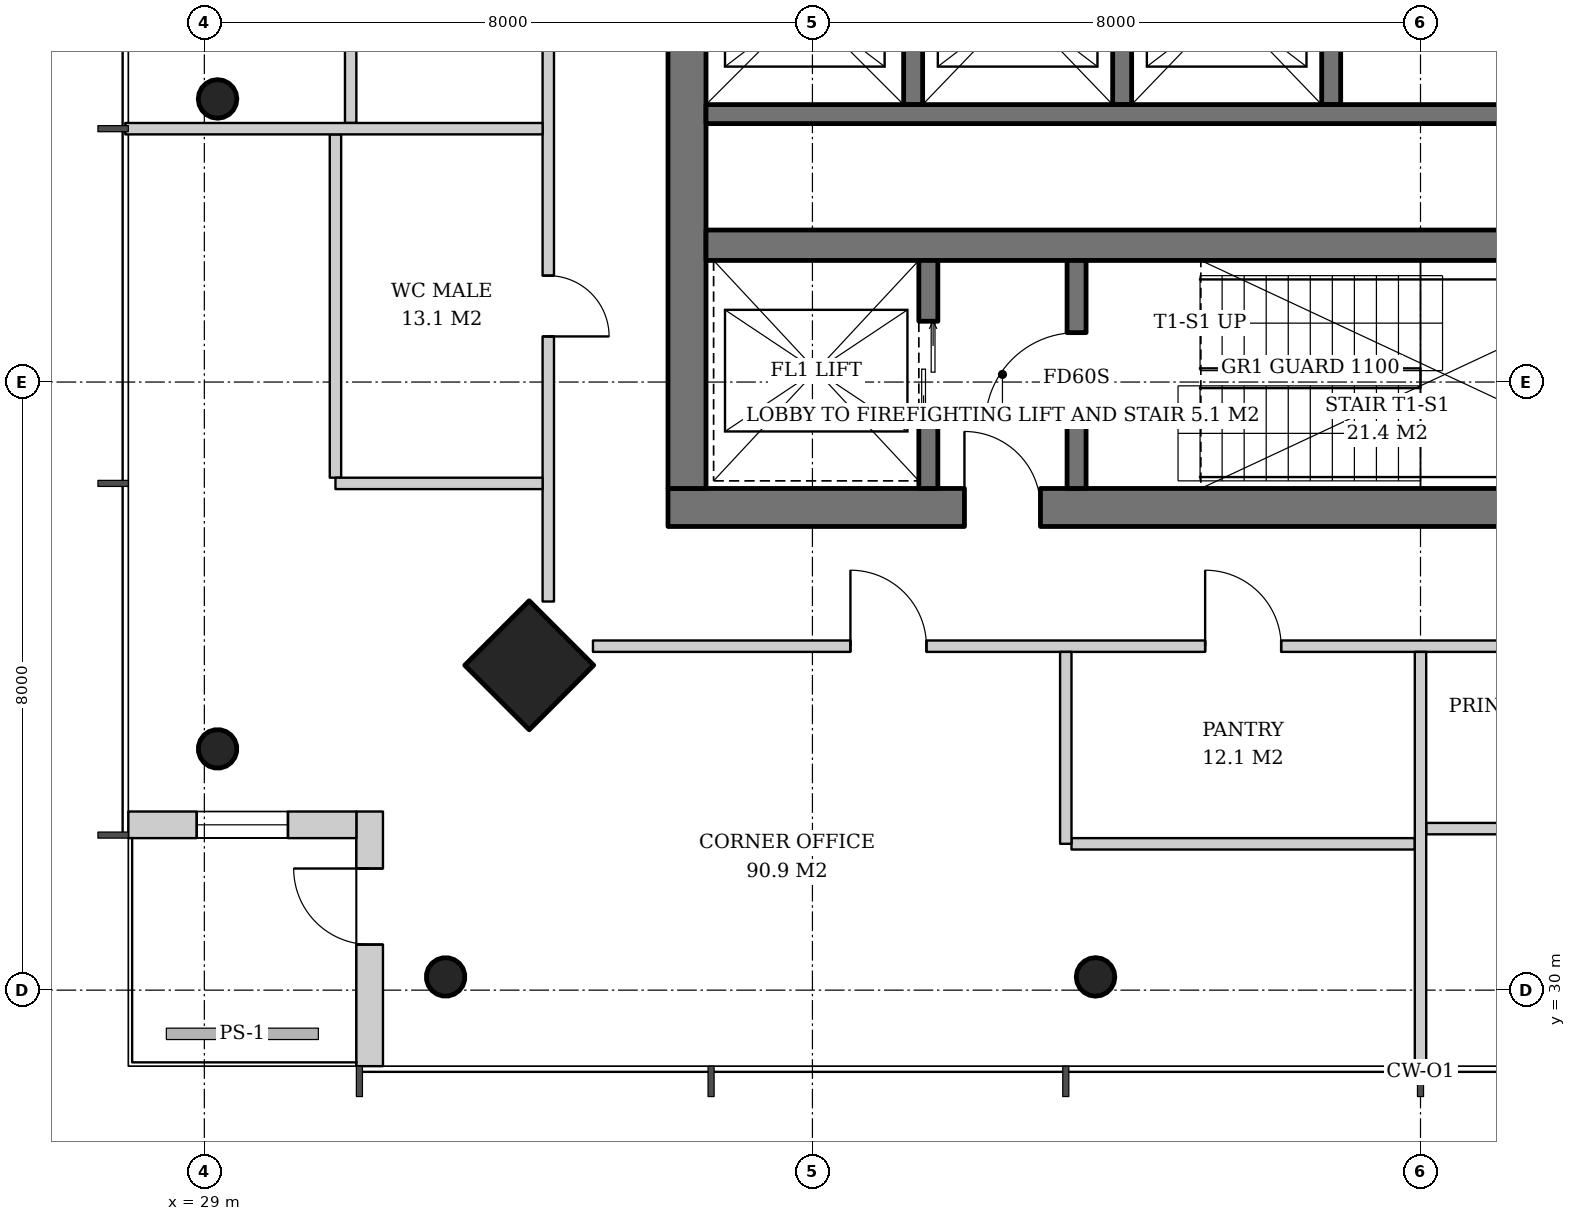
"""IFC4 building model, lengths in metres.
Left out: names, types, materials, properties, quantities, classifications, styles, units other than length and angle.
Written with IfcOpenShell. Run it as: python <this file> out.ifc"""

import sys

from ifc_helpers import new_model, si_unit, direction, frame, frame_2d, origin, origin_2d, place, context, subcontext, project, spatial, rectangle, hollow_circle, extrude, element, fill, save


model = new_model("IFC4")
c1 = context("Model", 3, precision=1e-05, world=origin(), true_north=direction((0.0, 1.0)))
c2 = subcontext(c1, "Body", "Model", "MODEL_VIEW")
j1 = project(units=[si_unit("LENGTHUNIT", "METRE"), si_unit("PLANEANGLEUNIT", "RADIAN")], contexts=[c1])
p1 = place(None, origin())
s1 = spatial("IfcSite", under=j1, at=p1, CompositionType="ELEMENT")
p2 = place(p1, origin())
s2 = spatial("IfcBuilding", under=s1, at=p2, CompositionType="ELEMENT")
p3 = place(p2, frame((0.0, 0.0, 275.6)))
s3 = spatial("IfcBuildingStorey", under=s2, at=p3, CompositionType="ELEMENT", Elevation=275.6)
p4 = place(p3, frame((33.236, 34.236, 0.0), z_axis=(0.031964207655, 0.031964207655, 0.998977766949), x_axis=(-0.707106781187, 0.707106781187, 0.0)))
e1 = element("IfcColumn", 1, at=p4, inside=s3, PredefinedType="COLUMN", context=c2, shape_type="SweptSolid", body=[
    extrude(rectangle(XDim=1.2, YDim=1.2, at=origin_2d()), origin(), (0.0, 0.0, 1.0), 3.804),
])
p5 = place(p3, frame((29.136, 33.136, 0.0), z_axis=(0.031900153262, 0.031900153262, 0.998981861919), x_axis=(-0.707106781187, 0.707106781187, 0.0)))
e2 = element("IfcColumn", 2, at=p5, inside=s3, PredefinedType="COLUMN", context=c2, shape_type="SweptSolid", body=[
    extrude(hollow_circle(Radius=0.254, WallThickness=0.02, at=origin_2d()), origin(), (0.0, 0.0, 1.0), 3.804),
])
p6 = place(p3, frame((29.136, 41.712, 0.0), z_axis=(0.031914583439, 0.010659599298, 0.999433755837), x_axis=(-0.316800238982, 0.948492281772, 0.0)))
e3 = element("IfcColumn", 3, at=p6, inside=s3, PredefinedType="COLUMN", context=c2, shape_type="SweptSolid", body=[
    extrude(hollow_circle(Radius=0.254, WallThickness=0.02, at=origin_2d()), origin(), (0.0, 0.0, 1.0), 3.802),
])
p7 = place(p3, frame((32.136, 30.136, 0.0), z_axis=(0.031900153262, 0.031900153262, 0.998981861919), x_axis=(-0.707106781187, 0.707106781187, 0.0)))
e4 = element("IfcColumn", 4, at=p7, inside=s3, PredefinedType="COLUMN", context=c2, shape_type="SweptSolid", body=[
    extrude(hollow_circle(Radius=0.254, WallThickness=0.02, at=origin_2d()), origin(), (0.0, 0.0, 1.0), 3.804),
])
p8 = place(p3, frame((40.712, 30.136, 0.0), z_axis=(0.010659599298, 0.031914583439, 0.999433755837), x_axis=(-0.948492281772, 0.316800238982, 0.0)))
e5 = element("IfcColumn", 5, at=p8, inside=s3, PredefinedType="COLUMN", context=c2, shape_type="SweptSolid", body=[
    extrude(hollow_circle(Radius=0.254, WallThickness=0.02, at=origin_2d()), origin(), (0.0, 0.0, 1.0), 3.802),
])
p9 = place(p3, frame((35.1, 36.35, 0.0), z_axis=(0.0, 0.0, 1.0), x_axis=(1.0, 0.0, 0.0)))
e6 = element("IfcWall", 6, at=p9, inside=s3, PredefinedType="SHEAR", context=c2, shape_type="SweptSolid", body=[
    extrude(rectangle(XDim=19.8, YDim=0.5, at=frame_2d((9.9, 0.0))), origin(), (0.0, 0.0, 1.0), 3.8),
])
p10 = place(p9, frame((3.9, 0.0, 0.0)))
e7 = element("IfcOpeningElement", 7, at=p10, cuts=e6, PredefinedType="OPENING", context=c2, shape_type="SweptSolid", body=[
    extrude(rectangle(XDim=1.0, YDim=2.1, at=frame_2d((0.5, 1.05))), frame((0.0, 0.26, 0.0), z_axis=(0.0, -1.0, 0.0), x_axis=(1.0, 0.0, 0.0)), (0.0, 0.0, 1.0), 0.52),
])
p11 = place(p9, frame((15.35, 0.0, 0.0)))
e8 = element("IfcOpeningElement", 8, at=p11, cuts=e6, PredefinedType="OPENING", context=c2, shape_type="SweptSolid", body=[
    extrude(rectangle(XDim=1.0, YDim=2.1, at=frame_2d((0.5, 1.05))), frame((0.0, 0.26, 0.0), z_axis=(0.0, -1.0, 0.0), x_axis=(1.0, 0.0, 0.0)), (0.0, 0.0, 1.0), 0.52),
])
p12 = place(p3, frame((35.35, 36.6, 0.0), z_axis=(0.0, 0.0, 1.0), x_axis=(0.0, 1.0, 0.0)))
e9 = element("IfcWall", 9, at=p12, inside=s3, PredefinedType="SHEAR", context=c2, shape_type="SweptSolid", body=[
    extrude(rectangle(XDim=18.8, YDim=0.5, at=frame_2d((9.4, 0.0))), origin(), (0.0, 0.0, 1.0), 3.8),
])
p13 = place(p12, frame((8.5, 0.0, 0.0)))
e10 = element("IfcOpeningElement", 10, at=p13, cuts=e9, PredefinedType="OPENING", context=c2, shape_type="SweptSolid", body=[
    extrude(rectangle(XDim=1.8, YDim=2.4, at=frame_2d((0.9, 1.2))), frame((0.0, 0.26, 0.0), z_axis=(0.0, -1.0, 0.0), x_axis=(1.0, 0.0, 0.0)), (0.0, 0.0, 1.0), 0.52),
])
p14 = place(p3, frame((35.6, 39.8, 0.0), z_axis=(0.0, 0.0, 1.0), x_axis=(1.0, 0.0, 0.0)))
e11 = element("IfcWall", 11, at=p14, inside=s3, PredefinedType="SHEAR", context=c2, shape_type="SweptSolid", body=[
    extrude(rectangle(XDim=18.8, YDim=0.4, at=frame_2d((9.4, 0.0))), origin(), (0.0, 0.0, 1.0), 3.8),
])
p15 = place(p3, frame((31.175, 29.0, 0.0), z_axis=(0.0, 0.0, 1.0), x_axis=(0.0, 1.0, 0.0)))
e12 = element("IfcWall", 12, at=p15, inside=s3, PredefinedType="SOLIDWALL", context=c2, shape_type="SweptSolid", body=[
    extrude(rectangle(XDim=3.35, YDim=0.35, at=frame_2d((1.675, 0.0))), origin(), (0.0, 0.0, 1.0), 3.62),
])
p16 = place(p15, frame((1.6, 0.0, 0.0)))
e13 = element("IfcOpeningElement", 13, at=p16, cuts=e12, PredefinedType="OPENING", context=c2, shape_type="SweptSolid", body=[
    extrude(rectangle(XDim=1.0, YDim=2.4, at=frame_2d((0.5, 1.2))), frame((0.0, 0.185, 0.0), z_axis=(0.0, -1.0, 0.0), x_axis=(1.0, 0.0, 0.0)), (0.0, 0.0, 1.0), 0.37),
])
p17 = place(p3, frame((31.0, 32.175, 0.0), z_axis=(0.0, 0.0, 1.0), x_axis=(-1.0, 0.0, 0.0)))
e14 = element("IfcWall", 14, at=p17, inside=s3, PredefinedType="SOLIDWALL", context=c2, shape_type="SweptSolid", body=[
    extrude(rectangle(XDim=3.0, YDim=0.35, at=frame_2d((1.5, 0.0))), origin(), (0.0, 0.0, 1.0), 3.62),
])
p18 = place(p17, frame((0.9, 0.0, 0.6)))
e15 = element("IfcOpeningElement", 15, at=p18, cuts=e14, PredefinedType="OPENING", context=c2, shape_type="SweptSolid", body=[
    extrude(rectangle(XDim=1.2, YDim=2.55, at=frame_2d((0.6, 1.275))), frame((0.0, 0.185, 0.0), z_axis=(0.0, -1.0, 0.0), x_axis=(1.0, 0.0, 0.0)), (0.0, 0.0, 1.0), 0.37),
])
p19 = place(p3, frame((38.525, 36.6, 0.0), z_axis=(0.0, 0.0, 1.0), x_axis=(0.0, 1.0, 0.0)))
e16 = element("IfcWall", 16, at=p19, inside=s3, PredefinedType="SHEAR", context=c2, shape_type="SweptSolid", body=[
    extrude(rectangle(XDim=3.0, YDim=0.25, at=frame_2d((1.5, 0.0))), origin(), (0.0, 0.0, 1.0), 3.8),
])
p20 = place(p19, frame((0.9, 0.0, 0.0)))
e17 = element("IfcOpeningElement", 17, at=p20, cuts=e16, PredefinedType="OPENING", context=c2, shape_type="SweptSolid", body=[
    extrude(rectangle(XDim=1.3, YDim=2.2, at=frame_2d((0.65, 1.1))), frame((0.0, 0.135, 0.0), z_axis=(0.0, -1.0, 0.0), x_axis=(1.0, 0.0, 0.0)), (0.0, 0.0, 1.0), 0.27),
])
p21 = place(p3, frame((40.475, 36.6, 0.0), z_axis=(0.0, 0.0, 1.0), x_axis=(0.0, 1.0, 0.0)))
e18 = element("IfcWall", 18, at=p21, inside=s3, PredefinedType="SHEAR", context=c2, shape_type="SweptSolid", body=[
    extrude(rectangle(XDim=3.0, YDim=0.25, at=frame_2d((1.5, 0.0))), origin(), (0.0, 0.0, 1.0), 3.8),
])
p22 = place(p21, frame((0.85, 0.0, 0.0)))
e19 = element("IfcOpeningElement", 19, at=p22, cuts=e18, PredefinedType="OPENING", context=c2, shape_type="SweptSolid", body=[
    extrude(rectangle(XDim=1.2, YDim=2.1, at=frame_2d((0.6, 1.05))), frame((0.0, 0.135, 0.0), z_axis=(0.0, -1.0, 0.0), x_axis=(1.0, 0.0, 0.0)), (0.0, 0.0, 1.0), 0.27),
])
for number, where, z_axis, x_axis in (
    (20, (38.325, 44.25, 0.0), (0.0, 0.0, 1.0), (0.0, -1.0, 0.0)),
    (21, (41.075, 44.25, 0.0), (0.0, 0.0, 1.0), (0.0, -1.0, 0.0)),
    (22, (43.825, 44.25, 0.0), (0.0, 0.0, 1.0), (0.0, -1.0, 0.0)),
):
    element("IfcWall", number, at=place(p3, frame(where, z_axis=z_axis, x_axis=x_axis)), inside=s3, PredefinedType="SHEAR", context=c2, shape_type="SweptSolid", body=[
        extrude(rectangle(XDim=2.6, YDim=0.25, at=frame_2d((1.3, 0.0))), origin(), (0.0, 0.0, 1.0), 3.8),
    ])
p23 = place(p3, frame((35.6, 41.525, 0.0), z_axis=(0.0, 0.0, 1.0), x_axis=(1.0, 0.0, 0.0)))
e23 = element("IfcWall", 23, at=p23, inside=s3, PredefinedType="SHEAR", context=c2, shape_type="SweptSolid", body=[
    extrude(rectangle(XDim=11.1, YDim=0.25, at=frame_2d((5.55, 0.0))), origin(), (0.0, 0.0, 1.0), 3.8),
])
for number, where, z_axis, x_axis in (
    (24, (30.925, 45.925, 0.0), (0.0, 0.0, 1.0), (0.0, -1.0, 0.0)),
    (25, (30.725, 41.258, 0.0), (0.0, 0.0, 1.0), (0.0, -1.0, 0.0)),
):
    element("IfcWall", number, at=place(p3, frame(where, z_axis=z_axis, x_axis=x_axis)), inside=s3, PredefinedType="PARTITIONING", context=c2, shape_type="SweptSolid", body=[
        extrude(rectangle(XDim=4.517, YDim=0.15, at=frame_2d((2.258, 0.0))), origin(), (0.0, 0.0, 1.0), 2.867),
    ])
p24 = place(p3, frame((33.525, 56.887, 0.0), z_axis=(0.0, 0.0, 1.0), x_axis=(0.0, -1.0, 0.0)))
e26 = element("IfcWall", 26, at=p24, inside=s3, PredefinedType="PARTITIONING", context=c2, shape_type="SweptSolid", body=[
    extrude(rectangle(XDim=21.774, YDim=0.15, at=frame_2d((10.887, 0.0))), origin(), (0.0, 0.0, 1.0), 2.867),
])
p25 = place(p24, frame((3.387, 0.0, 0.0)))
e27 = element("IfcOpeningElement", 27, at=p25, cuts=e26, PredefinedType="OPENING", context=c2, shape_type="SweptSolid", body=[
    extrude(rectangle(XDim=1.0, YDim=2.1, at=frame_2d((0.5, 1.05))), frame((0.0, 0.085, 0.0), z_axis=(0.0, -1.0, 0.0), x_axis=(1.0, 0.0, 0.0)), (0.0, 0.0, 1.0), 0.17),
])
p26 = place(p24, frame((8.154, 0.0, 0.0)))
e28 = element("IfcOpeningElement", 28, at=p26, cuts=e26, PredefinedType="OPENING", context=c2, shape_type="SweptSolid", body=[
    extrude(rectangle(XDim=0.8, YDim=2.1, at=frame_2d((0.4, 1.05))), frame((0.0, 0.085, 0.0), z_axis=(0.0, -1.0, 0.0), x_axis=(1.0, 0.0, 0.0)), (0.0, 0.0, 1.0), 0.17),
])
p27 = place(p24, frame((12.72, 0.0, 0.0)))
e29 = element("IfcOpeningElement", 29, at=p27, cuts=e26, PredefinedType="OPENING", context=c2, shape_type="SweptSolid", body=[
    extrude(rectangle(XDim=1.0, YDim=2.1, at=frame_2d((0.5, 1.05))), frame((0.0, 0.085, 0.0), z_axis=(0.0, -1.0, 0.0), x_axis=(1.0, 0.0, 0.0)), (0.0, 0.0, 1.0), 0.17),
])
p28 = place(p24, frame((17.487, 0.0, 0.0)))
e30 = element("IfcOpeningElement", 30, at=p28, cuts=e26, PredefinedType="OPENING", context=c2, shape_type="SweptSolid", body=[
    extrude(rectangle(XDim=0.8, YDim=2.1, at=frame_2d((0.4, 1.05))), frame((0.0, 0.085, 0.0), z_axis=(0.0, -1.0, 0.0), x_axis=(1.0, 0.0, 0.0)), (0.0, 0.0, 1.0), 0.17),
])
p29 = place(p3, frame((33.45, 41.333, 0.0), z_axis=(0.0, 0.0, 1.0), x_axis=(-1.0, 0.0, 0.0)))
e31 = element("IfcWall", 31, at=p29, inside=s3, PredefinedType="PARTITIONING", context=c2, shape_type="SweptSolid", body=[
    extrude(rectangle(XDim=5.49, YDim=0.15, at=frame_2d((2.745, 0.0))), origin(), (0.0, 0.0, 1.0), 3.12),
])
p30 = place(p3, frame((33.45, 36.667, 0.0), z_axis=(0.0, 0.0, 1.0), x_axis=(-1.0, 0.0, 0.0)))
e32 = element("IfcWall", 32, at=p30, inside=s3, PredefinedType="PARTITIONING", context=c2, shape_type="SweptSolid", body=[
    extrude(rectangle(XDim=2.725, YDim=0.15, at=frame_2d((1.362, 0.0))), origin(), (0.0, 0.0, 1.0), 3.62),
])
for number, where, z_axis, x_axis in (
    (33, (40.408, 31.925, 0.0), (0.0, 0.0, 1.0), (1.0, 0.0, 0.0)),
    (34, (45.075, 32.125, 0.0), (0.0, 0.0, 1.0), (1.0, 0.0, 0.0)),
):
    element("IfcWall", number, at=place(p3, frame(where, z_axis=z_axis, x_axis=x_axis)), inside=s3, PredefinedType="PARTITIONING", context=c2, shape_type="SweptSolid", body=[
        extrude(rectangle(XDim=4.517, YDim=0.15, at=frame_2d((2.258, 0.0))), origin(), (0.0, 0.0, 1.0), 2.867),
    ])
p31 = place(p3, frame((34.113, 34.525, 0.0), z_axis=(0.0, 0.0, 1.0), x_axis=(1.0, 0.0, 0.0)))
e35 = element("IfcWall", 35, at=p31, inside=s3, PredefinedType="PARTITIONING", context=c2, shape_type="SweptSolid", body=[
    extrude(rectangle(XDim=21.774, YDim=0.15, at=frame_2d((10.887, 0.0))), origin(), (0.0, 0.0, 1.0), 2.867),
])
p32 = place(p31, frame((3.387, 0.0, 0.0)))
e36 = element("IfcOpeningElement", 36, at=p32, cuts=e35, PredefinedType="OPENING", context=c2, shape_type="SweptSolid", body=[
    extrude(rectangle(XDim=1.0, YDim=2.1, at=frame_2d((0.5, 1.05))), frame((0.0, 0.085, 0.0), z_axis=(0.0, -1.0, 0.0), x_axis=(1.0, 0.0, 0.0)), (0.0, 0.0, 1.0), 0.17),
])
p33 = place(p31, frame((8.054, 0.0, 0.0)))
e37 = element("IfcOpeningElement", 37, at=p33, cuts=e35, PredefinedType="OPENING", context=c2, shape_type="SweptSolid", body=[
    extrude(rectangle(XDim=1.0, YDim=2.1, at=frame_2d((0.5, 1.05))), frame((0.0, 0.085, 0.0), z_axis=(0.0, -1.0, 0.0), x_axis=(1.0, 0.0, 0.0)), (0.0, 0.0, 1.0), 0.17),
])
p34 = place(p31, frame((12.72, 0.0, 0.0)))
e38 = element("IfcOpeningElement", 38, at=p34, cuts=e35, PredefinedType="OPENING", context=c2, shape_type="SweptSolid", body=[
    extrude(rectangle(XDim=1.0, YDim=2.1, at=frame_2d((0.5, 1.05))), frame((0.0, 0.085, 0.0), z_axis=(0.0, -1.0, 0.0), x_axis=(1.0, 0.0, 0.0)), (0.0, 0.0, 1.0), 0.17),
])
p35 = place(p31, frame((17.387, 0.0, 0.0)))
e39 = element("IfcOpeningElement", 39, at=p35, cuts=e35, PredefinedType="OPENING", context=c2, shape_type="SweptSolid", body=[
    extrude(rectangle(XDim=1.0, YDim=2.1, at=frame_2d((0.5, 1.05))), frame((0.0, 0.085, 0.0), z_axis=(0.0, -1.0, 0.0), x_axis=(1.0, 0.0, 0.0)), (0.0, 0.0, 1.0), 0.17),
])
p36 = place(p3, frame((40.333, 34.45, 0.0), z_axis=(0.0, 0.0, 1.0), x_axis=(0.0, -1.0, 0.0)))
e40 = element("IfcWall", 40, at=p36, inside=s3, PredefinedType="PARTITIONING", context=c2, shape_type="SweptSolid", body=[
    extrude(rectangle(XDim=2.525, YDim=0.15, at=frame_2d((1.262, 0.0))), origin(), (0.0, 0.0, 1.0), 3.62),
])
p37 = place(p3, frame((45.0, 34.45, 0.0), z_axis=(0.0, 0.0, 1.0), x_axis=(0.0, -1.0, 0.0)))
e41 = element("IfcWall", 41, at=p37, inside=s3, PredefinedType="PARTITIONING", context=c2, shape_type="SweptSolid", body=[
    extrude(rectangle(XDim=5.49, YDim=0.15, at=frame_2d((2.745, 0.0))), origin(), (0.0, 0.0, 1.0), 3.12),
])
p38 = place(p16, origin())
e42 = element("IfcDoor", 42, at=p38, inside=s3, OperationType="SINGLE_SWING_RIGHT", PredefinedType="DOOR", context=c2, shape_type="SweptSolid", body=[
    extrude(rectangle(XDim=1.0, YDim=2.4, at=frame_2d((0.5, 1.2))), frame((0.0, 0.025, 0.0), z_axis=(0.0, -1.0, 0.0), x_axis=(1.0, 0.0, 0.0)), (0.0, 0.0, 1.0), 0.05),
])
fill(e13, e42)
p39 = place(p18, origin())
e43 = element("IfcWindow", 43, at=p39, inside=s3, PartitioningType="SINGLE_PANEL", PredefinedType="WINDOW", context=c2, shape_type="SweptSolid", body=[
    extrude(rectangle(XDim=1.2, YDim=2.55, at=frame_2d((0.6, 1.275))), frame((0.0, 0.03, 0.0), z_axis=(0.0, -1.0, 0.0), x_axis=(1.0, 0.0, 0.0)), (0.0, 0.0, 1.0), 0.06),
])
fill(e15, e43)
p40 = place(p20, origin())
e44 = element("IfcDoor", 44, at=p40, inside=s3, OperationType="DOUBLE_DOOR_SLIDING", PredefinedType="DOOR", context=c2, shape_type="SweptSolid", body=[
    extrude(rectangle(XDim=1.3, YDim=2.2, at=frame_2d((0.65, 1.1))), frame((0.0, 0.025, 0.0), z_axis=(0.0, -1.0, 0.0), x_axis=(1.0, 0.0, 0.0)), (0.0, 0.0, 1.0), 0.05),
])
fill(e17, e44)
p41 = place(p22, origin())
e45 = element("IfcDoor", 45, at=p41, inside=s3, OperationType="SINGLE_SWING_LEFT", PredefinedType="DOOR", context=c2, shape_type="SweptSolid", body=[
    extrude(rectangle(XDim=1.2, YDim=2.1, at=frame_2d((0.6, 1.05))), frame((0.0, 0.025, 0.0), z_axis=(0.0, -1.0, 0.0), x_axis=(1.0, 0.0, 0.0)), (0.0, 0.0, 1.0), 0.05),
])
fill(e19, e45)
p42 = place(p10, origin())
e46 = element("IfcDoor", 46, at=p42, inside=s3, OperationType="SINGLE_SWING_LEFT", PredefinedType="DOOR", context=c2, shape_type="SweptSolid", body=[
    extrude(rectangle(XDim=1.0, YDim=2.1, at=frame_2d((0.5, 1.05))), frame((0.0, 0.025, 0.0), z_axis=(0.0, -1.0, 0.0), x_axis=(1.0, 0.0, 0.0)), (0.0, 0.0, 1.0), 0.05),
])
fill(e7, e46)
p43 = place(p28, origin())
e47 = element("IfcDoor", 47, at=p43, inside=s3, OperationType="SINGLE_SWING_RIGHT", PredefinedType="DOOR", context=c2, shape_type="SweptSolid", body=[
    extrude(rectangle(XDim=0.8, YDim=2.1, at=frame_2d((0.4, 1.05))), frame((0.0, 0.025, 0.0), z_axis=(0.0, -1.0, 0.0), x_axis=(1.0, 0.0, 0.0)), (0.0, 0.0, 1.0), 0.05),
])
fill(e30, e47)
p44 = place(p32, origin())
e48 = element("IfcDoor", 48, at=p44, inside=s3, OperationType="SINGLE_SWING_LEFT", PredefinedType="DOOR", context=c2, shape_type="SweptSolid", body=[
    extrude(rectangle(XDim=1.0, YDim=2.1, at=frame_2d((0.5, 1.05))), frame((0.0, 0.025, 0.0), z_axis=(0.0, -1.0, 0.0), x_axis=(1.0, 0.0, 0.0)), (0.0, 0.0, 1.0), 0.05),
])
fill(e36, e48)
p45 = place(p33, origin())
e49 = element("IfcDoor", 49, at=p45, inside=s3, OperationType="SINGLE_SWING_LEFT", PredefinedType="DOOR", context=c2, shape_type="SweptSolid", body=[
    extrude(rectangle(XDim=1.0, YDim=2.1, at=frame_2d((0.5, 1.05))), frame((0.0, 0.025, 0.0), z_axis=(0.0, -1.0, 0.0), x_axis=(1.0, 0.0, 0.0)), (0.0, 0.0, 1.0), 0.05),
])
fill(e37, e49)
save(model, sys.argv[1])
